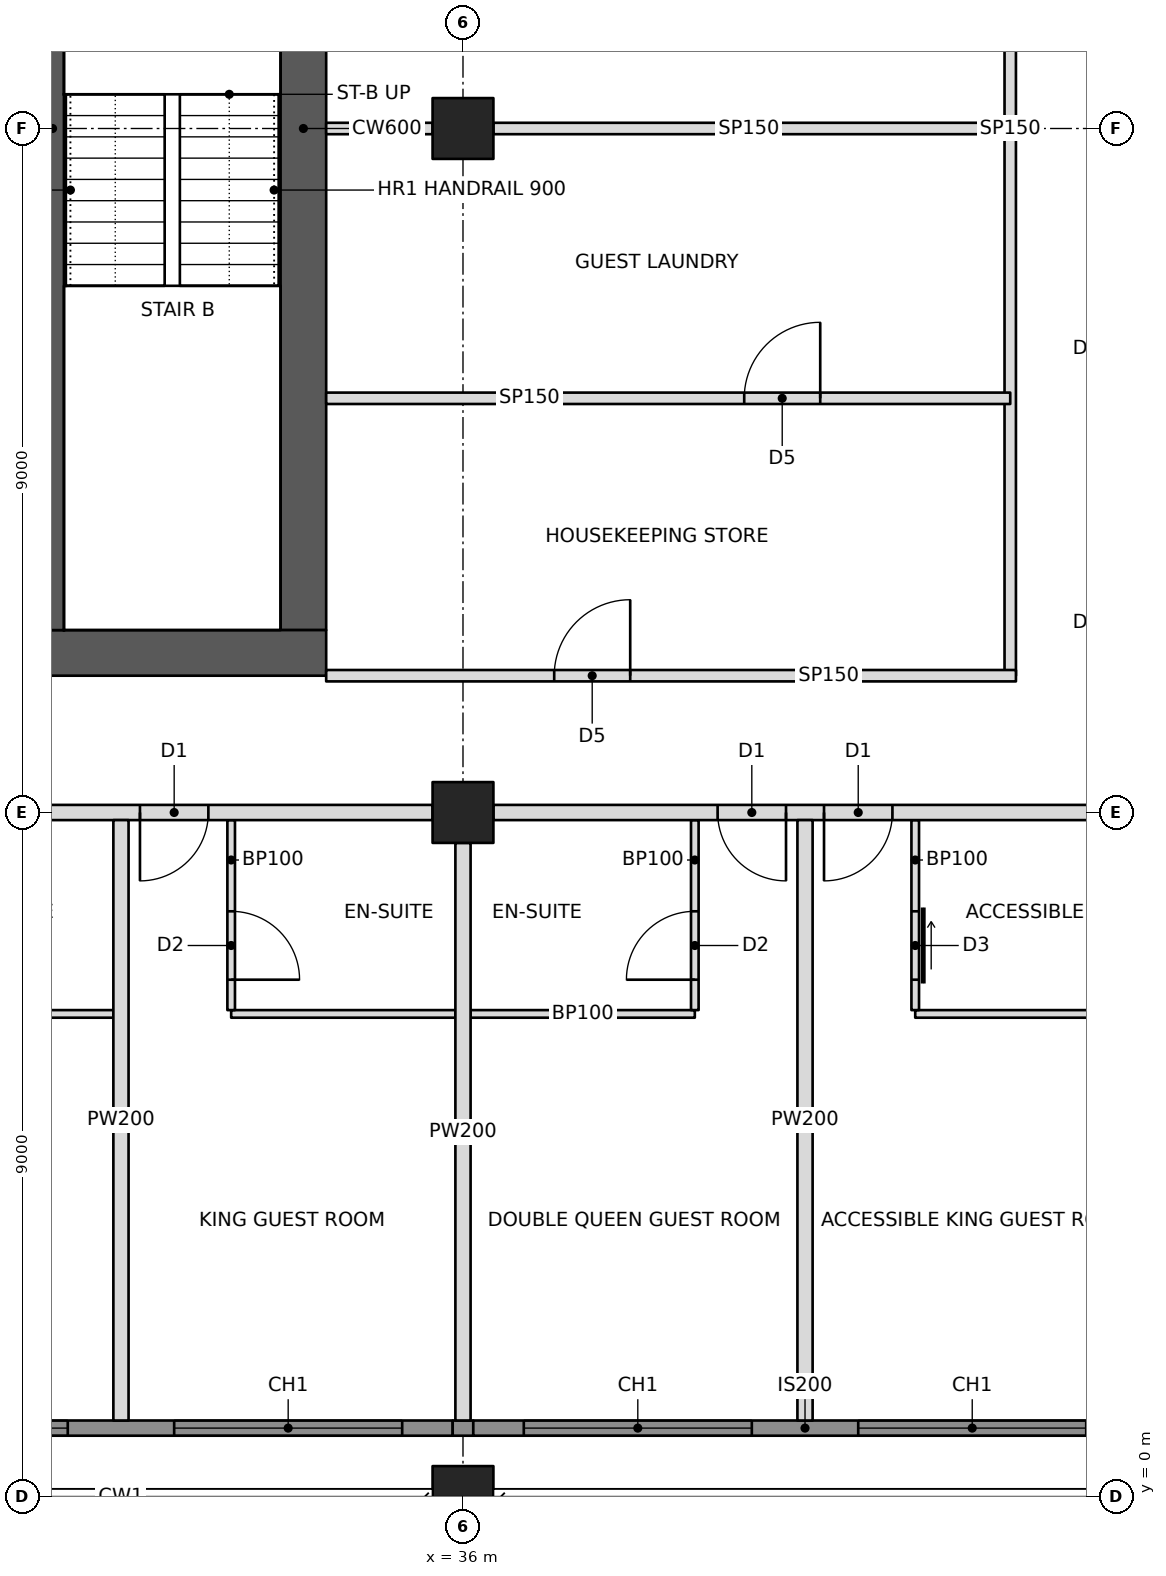
"""IFC4 building model, lengths in metres.
Left out: names, types, materials, properties, quantities, classifications, styles, units other than length and angle.
Written with IfcOpenShell. Run it as: python <this file> out.ifc"""

import sys

from ifc_helpers import new_model, si_unit, direction, frame, frame_2d, origin, origin_2d, place, context, subcontext, project, spatial, rectangle, hollow_rectangle, extrude, element, fill, save


model = new_model("IFC4")
c1 = context("Model", 3, precision=1e-05, world=origin(), true_north=direction((0.0, 1.0)))
c2 = subcontext(c1, "Body", "Model", "MODEL_VIEW")
j1 = project(units=[si_unit("LENGTHUNIT", "METRE"), si_unit("PLANEANGLEUNIT", "RADIAN")], contexts=[c1])
p1 = place(None, origin())
s1 = spatial("IfcSite", under=j1, at=p1, CompositionType="ELEMENT")
p2 = place(p1, origin())
s2 = spatial("IfcBuilding", under=s1, at=p2, CompositionType="ELEMENT")
p3 = place(p2, frame((0.0, 0.0, 82.4)))
s3 = spatial("IfcBuildingStorey", under=s2, at=p3, CompositionType="ELEMENT", Elevation=82.4)
p4 = place(p3, frame((36.0, 0.0, 0.0), z_axis=(0.0, 0.0, 1.0), x_axis=(1.0, 0.0, 0.0)))
e1 = element("IfcColumn", 1, at=p4, inside=s3, PredefinedType="COLUMN", context=c2, shape_type="SweptSolid", body=[
    extrude(hollow_rectangle(XDim=0.8, YDim=0.8, WallThickness=0.07, at=origin_2d()), origin(), (0.0, 0.0, 1.0), 3.4),
])
for number, where, z_axis, x_axis in (
    (2, (36.0, 9.0, 0.0), (0.0, 0.0, 1.0), (0.0, 1.0, 0.0)),
    (3, (36.0, 18.0, 0.0), (0.0, 0.0, 1.0), (0.0, 1.0, 0.0)),
):
    element("IfcColumn", number, at=place(p3, frame(where, z_axis=z_axis, x_axis=x_axis)), inside=s3, PredefinedType="COLUMN", context=c2, shape_type="SweptSolid", body=[
        extrude(hollow_rectangle(XDim=0.8, YDim=0.8, WallThickness=0.09, at=origin_2d()), origin(), (0.0, 0.0, 1.0), 3.4),
    ])
p5 = place(p3, frame((10.8, 11.1, 0.0), z_axis=(0.0, 0.0, 1.0), x_axis=(1.0, 0.0, 0.0)))
e4 = element("IfcWall", 4, at=p5, inside=s3, PredefinedType="SHEAR", context=c2, shape_type="SweptSolid", body=[
    extrude(rectangle(XDim=23.4, YDim=0.6, at=frame_2d((11.7, 0.0))), origin(), (0.0, 0.0, 1.0), 3.4),
])
p6 = place(p5, frame((1.0, 0.0, 0.0)))
e5 = element("IfcOpeningElement", 5, at=p6, cuts=e4, PredefinedType="OPENING", context=c2, shape_type="SweptSolid", body=[
    extrude(rectangle(XDim=1.0, YDim=2.1, at=frame_2d((0.5, 1.05))), frame((0.0, 0.31, 0.0), z_axis=(0.0, -1.0, 0.0), x_axis=(1.0, 0.0, 0.0)), (0.0, 0.0, 1.0), 0.62),
])
p7 = place(p5, frame((17.2, 0.0, 0.0)))
e6 = element("IfcOpeningElement", 6, at=p7, cuts=e4, PredefinedType="OPENING", context=c2, shape_type="SweptSolid", body=[
    extrude(rectangle(XDim=1.8, YDim=2.1, at=frame_2d((0.9, 1.05))), frame((0.0, 0.31, 0.0), z_axis=(0.0, -1.0, 0.0), x_axis=(1.0, 0.0, 0.0)), (0.0, 0.0, 1.0), 0.62),
])
p8 = place(p3, frame((33.9, 11.4, 0.0), z_axis=(0.0, 0.0, 1.0), x_axis=(0.0, 1.0, 0.0)))
e7 = element("IfcWall", 7, at=p8, inside=s3, PredefinedType="SHEAR", context=c2, shape_type="SweptSolid", body=[
    extrude(rectangle(XDim=13.2, YDim=0.6, at=frame_2d((6.6, 0.0))), origin(), (0.0, 0.0, 1.0), 3.4),
])
p9 = place(p3, frame((30.6, 11.4, 0.0), z_axis=(0.0, 0.0, 1.0), x_axis=(0.0, 1.0, 0.0)))
e8 = element("IfcWall", 8, at=p9, inside=s3, PredefinedType="SHEAR", context=c2, shape_type="SweptSolid", body=[
    extrude(rectangle(XDim=13.2, YDim=0.3, at=frame_2d((6.6, 0.0))), origin(), (0.0, 0.0, 1.0), 3.4),
])
p10 = place(p3, frame((27.4, 9.0, 0.0), z_axis=(0.0, 0.0, 1.0), x_axis=(1.0, 0.0, 0.0)))
e9 = element("IfcWall", 9, at=p10, inside=s3, PredefinedType="PARTITIONING", context=c2, shape_type="SweptSolid", body=[
    extrude(rectangle(XDim=8.2, YDim=0.2, at=frame_2d((4.1, 0.0))), origin(), (0.0, 0.0, 1.0), 2.405),
])
p11 = place(p10, frame((4.35, 0.0, 0.0)))
e10 = element("IfcOpeningElement", 10, at=p11, cuts=e9, PredefinedType="OPENING", context=c2, shape_type="SweptSolid", body=[
    extrude(rectangle(XDim=0.9, YDim=2.1, at=frame_2d((0.45, 1.05))), frame((0.0, 0.11, 0.0), z_axis=(0.0, -1.0, 0.0), x_axis=(1.0, 0.0, 0.0)), (0.0, 0.0, 1.0), 0.22),
])
p12 = place(p3, frame((36.4, 9.0, 0.0), z_axis=(0.0, 0.0, 1.0), x_axis=(1.0, 0.0, 0.0)))
e11 = element("IfcWall", 11, at=p12, inside=s3, PredefinedType="PARTITIONING", context=c2, shape_type="SweptSolid", body=[
    extrude(rectangle(XDim=8.2, YDim=0.2, at=frame_2d((4.1, 0.0))), origin(), (0.0, 0.0, 1.0), 2.438),
])
p13 = place(p12, frame((2.95, 0.0, 0.0)))
e12 = element("IfcOpeningElement", 12, at=p13, cuts=e11, PredefinedType="OPENING", context=c2, shape_type="SweptSolid", body=[
    extrude(rectangle(XDim=0.9, YDim=2.1, at=frame_2d((0.45, 1.05))), frame((0.0, 0.11, 0.0), z_axis=(0.0, -1.0, 0.0), x_axis=(1.0, 0.0, 0.0)), (0.0, 0.0, 1.0), 0.22),
])
p14 = place(p12, frame((4.35, 0.0, 0.0)))
e13 = element("IfcOpeningElement", 13, at=p14, cuts=e11, PredefinedType="OPENING", context=c2, shape_type="SweptSolid", body=[
    extrude(rectangle(XDim=0.9, YDim=2.1, at=frame_2d((0.45, 1.05))), frame((0.0, 0.11, 0.0), z_axis=(0.0, -1.0, 0.0), x_axis=(1.0, 0.0, 0.0)), (0.0, 0.0, 1.0), 0.22),
])
p15 = place(p3, frame((34.2, 10.8, 0.0), z_axis=(0.0, 0.0, 1.0), x_axis=(1.0, 0.0, 0.0)))
e14 = element("IfcWall", 14, at=p15, inside=s3, PredefinedType="PARTITIONING", context=c2, shape_type="SweptSolid", body=[
    extrude(rectangle(XDim=9.075, YDim=0.15, at=frame_2d((4.538, 0.0))), origin(), (0.0, 0.0, 1.0), 2.404),
])
p16 = place(p15, frame((3.0, 0.0, 0.0)))
e15 = element("IfcOpeningElement", 15, at=p16, cuts=e14, PredefinedType="OPENING", context=c2, shape_type="SweptSolid", body=[
    extrude(rectangle(XDim=1.0, YDim=2.1, at=frame_2d((0.5, 1.05))), frame((0.0, 0.085, 0.0), z_axis=(0.0, -1.0, 0.0), x_axis=(1.0, 0.0, 0.0)), (0.0, 0.0, 1.0), 0.17),
])
p17 = place(p3, frame((43.2, 10.8, 0.0), z_axis=(0.0, 0.0, 1.0), x_axis=(0.0, 1.0, 0.0)))
e16 = element("IfcWall", 16, at=p17, inside=s3, PredefinedType="PARTITIONING", context=c2, shape_type="SweptSolid", body=[
    extrude(rectangle(XDim=14.4, YDim=0.15, at=frame_2d((7.2, 0.0))), origin(), (0.0, 0.0, 1.0), 2.404),
])
p18 = place(p3, frame((34.2, 18.0, 0.0), z_axis=(0.0, 0.0, 1.0), x_axis=(1.0, 0.0, 0.0)))
e17 = element("IfcWall", 17, at=p18, inside=s3, PredefinedType="PARTITIONING", context=c2, shape_type="SweptSolid", body=[
    extrude(rectangle(XDim=1.4, YDim=0.15, at=frame_2d((0.7, 0.0))), origin(), (0.0, 0.0, 1.0), 3.2),
])
p19 = place(p3, frame((36.4, 18.0, 0.0), z_axis=(0.0, 0.0, 1.0), x_axis=(1.0, 0.0, 0.0)))
e18 = element("IfcWall", 18, at=p19, inside=s3, PredefinedType="PARTITIONING", context=c2, shape_type="SweptSolid", body=[
    extrude(rectangle(XDim=6.725, YDim=0.15, at=frame_2d((3.363, 0.0))), origin(), (0.0, 0.0, 1.0), 2.405),
])
p20 = place(p3, frame((34.2, 14.45, 0.0), z_axis=(0.0, 0.0, 1.0), x_axis=(1.0, 0.0, 0.0)))
e19 = element("IfcWall", 19, at=p20, inside=s3, PredefinedType="PARTITIONING", context=c2, shape_type="SweptSolid", body=[
    extrude(rectangle(XDim=9.0, YDim=0.15, at=frame_2d((4.5, 0.0))), origin(), (0.0, 0.0, 1.0), 2.404),
])
p21 = place(p20, frame((5.5, 0.0, 0.0)))
e20 = element("IfcOpeningElement", 20, at=p21, cuts=e19, PredefinedType="OPENING", context=c2, shape_type="SweptSolid", body=[
    extrude(rectangle(XDim=1.0, YDim=2.1, at=frame_2d((0.5, 1.05))), frame((0.0, 0.085, 0.0), z_axis=(0.0, -1.0, 0.0), x_axis=(1.0, 0.0, 0.0)), (0.0, 0.0, 1.0), 0.17),
])
p22 = place(p3, frame((31.5, 8.9, 0.0), z_axis=(0.0, 0.0, 1.0), x_axis=(0.0, -1.0, 0.0)))
e21 = element("IfcWall", 21, at=p22, inside=s3, PredefinedType="PARTITIONING", context=c2, shape_type="SweptSolid", body=[
    extrude(rectangle(XDim=7.9, YDim=0.2, at=frame_2d((3.95, 0.0))), origin(), (0.0, 0.0, 1.0), 2.404),
])
p23 = place(p3, frame((36.0, 8.6, 0.0), z_axis=(0.0, 0.0, 1.0), x_axis=(0.0, -1.0, 0.0)))
e22 = element("IfcWall", 22, at=p23, inside=s3, PredefinedType="PARTITIONING", context=c2, shape_type="SweptSolid", body=[
    extrude(rectangle(XDim=7.6, YDim=0.2, at=frame_2d((3.8, 0.0))), origin(), (0.0, 0.0, 1.0), 2.438),
])
p24 = place(p3, frame((40.5, 8.9, 0.0), z_axis=(0.0, 0.0, 1.0), x_axis=(0.0, -1.0, 0.0)))
e23 = element("IfcWall", 23, at=p24, inside=s3, PredefinedType="PARTITIONING", context=c2, shape_type="SweptSolid", body=[
    extrude(rectangle(XDim=7.9, YDim=0.2, at=frame_2d((3.95, 0.0))), origin(), (0.0, 0.0, 1.0), 2.438),
])
p25 = place(p3, frame((27.95, 6.35, 0.0), z_axis=(0.0, 0.0, 1.0), x_axis=(1.0, 0.0, 0.0)))
e24 = element("IfcWall", 24, at=p25, inside=s3, PredefinedType="PARTITIONING", context=c2, shape_type="SweptSolid", body=[
    extrude(rectangle(XDim=3.45, YDim=0.1, at=frame_2d((1.725, 0.0))), origin(), (0.0, 0.0, 1.0), 3.2),
])
p26 = place(p3, frame((32.95, 6.35, 0.0), z_axis=(0.0, 0.0, 1.0), x_axis=(1.0, 0.0, 0.0)))
e25 = element("IfcWall", 25, at=p26, inside=s3, PredefinedType="PARTITIONING", context=c2, shape_type="SweptSolid", body=[
    extrude(rectangle(XDim=2.95, YDim=0.1, at=frame_2d((1.475, 0.0))), origin(), (0.0, 0.0, 1.0), 2.438),
])
p27 = place(p3, frame((32.95, 8.9, 0.0), z_axis=(0.0, 0.0, 1.0), x_axis=(0.0, -1.0, 0.0)))
e26 = element("IfcWall", 26, at=p27, inside=s3, PredefinedType="PARTITIONING", context=c2, shape_type="SweptSolid", body=[
    extrude(rectangle(XDim=2.5, YDim=0.1, at=frame_2d((1.25, 0.0))), origin(), (0.0, 0.0, 1.0), 2.404),
])
p28 = place(p27, frame((1.2, 0.0, 0.0)))
e27 = element("IfcOpeningElement", 27, at=p28, cuts=e26, PredefinedType="OPENING", context=c2, shape_type="SweptSolid", body=[
    extrude(rectangle(XDim=0.9, YDim=2.1, at=frame_2d((0.45, 1.05))), frame((0.0, 0.06, 0.0), z_axis=(0.0, -1.0, 0.0), x_axis=(1.0, 0.0, 0.0)), (0.0, 0.0, 1.0), 0.12),
])
p29 = place(p3, frame((36.1, 6.35, 0.0), z_axis=(0.0, 0.0, 1.0), x_axis=(1.0, 0.0, 0.0)))
e28 = element("IfcWall", 28, at=p29, inside=s3, PredefinedType="PARTITIONING", context=c2, shape_type="SweptSolid", body=[
    extrude(rectangle(XDim=2.95, YDim=0.1, at=frame_2d((1.475, 0.0))), origin(), (0.0, 0.0, 1.0), 2.438),
])
p30 = place(p3, frame((39.05, 8.9, 0.0), z_axis=(0.0, 0.0, 1.0), x_axis=(0.0, -1.0, 0.0)))
e29 = element("IfcWall", 29, at=p30, inside=s3, PredefinedType="PARTITIONING", context=c2, shape_type="SweptSolid", body=[
    extrude(rectangle(XDim=2.5, YDim=0.1, at=frame_2d((1.25, 0.0))), origin(), (0.0, 0.0, 1.0), 2.438),
])
p31 = place(p30, frame((1.2, 0.0, 0.0)))
e30 = element("IfcOpeningElement", 30, at=p31, cuts=e29, PredefinedType="OPENING", context=c2, shape_type="SweptSolid", body=[
    extrude(rectangle(XDim=0.9, YDim=2.1, at=frame_2d((0.45, 1.05))), frame((0.0, 0.06, 0.0), z_axis=(0.0, -1.0, 0.0), x_axis=(1.0, 0.0, 0.0)), (0.0, 0.0, 1.0), 0.12),
])
p32 = place(p3, frame((41.95, 6.35, 0.0), z_axis=(0.0, 0.0, 1.0), x_axis=(1.0, 0.0, 0.0)))
e31 = element("IfcWall", 31, at=p32, inside=s3, PredefinedType="PARTITIONING", context=c2, shape_type="SweptSolid", body=[
    extrude(rectangle(XDim=2.95, YDim=0.1, at=frame_2d((1.475, 0.0))), origin(), (0.0, 0.0, 1.0), 2.438),
])
p33 = place(p3, frame((41.95, 8.9, 0.0), z_axis=(0.0, 0.0, 1.0), x_axis=(0.0, -1.0, 0.0)))
e32 = element("IfcWall", 32, at=p33, inside=s3, PredefinedType="PARTITIONING", context=c2, shape_type="SweptSolid", body=[
    extrude(rectangle(XDim=2.5, YDim=0.1, at=frame_2d((1.25, 0.0))), origin(), (0.0, 0.0, 1.0), 2.438),
])
p34 = place(p33, frame((1.2, 0.0, 0.0)))
e33 = element("IfcOpeningElement", 33, at=p34, cuts=e32, PredefinedType="OPENING", context=c2, shape_type="SweptSolid", body=[
    extrude(rectangle(XDim=0.9, YDim=2.1, at=frame_2d((0.45, 1.05))), frame((0.0, 0.06, 0.0), z_axis=(0.0, -1.0, 0.0), x_axis=(1.0, 0.0, 0.0)), (0.0, 0.0, 1.0), 0.12),
])
p35 = place(p3, frame((27.194, 0.9, 0.0), z_axis=(0.0, 0.0, 1.0), x_axis=(1.0, 0.0, 0.0)))
e34 = element("IfcWall", 34, at=p35, inside=s3, PredefinedType="SOLIDWALL", context=c2, shape_type="SweptSolid", body=[
    extrude(rectangle(XDim=8.671, YDim=0.2, at=frame_2d((4.335, 0.0))), origin(), (0.0, 0.0, 1.0), 3.2),
])
p36 = place(p35, frame((0.606, 0.0, 0.6)))
e35 = element("IfcOpeningElement", 35, at=p36, cuts=e34, PredefinedType="OPENING", context=c2, shape_type="SweptSolid", body=[
    extrude(rectangle(XDim=3.0, YDim=2.2, at=frame_2d((1.5, 1.1))), frame((0.0, 0.11, 0.0), z_axis=(0.0, -1.0, 0.0), x_axis=(1.0, 0.0, 0.0)), (0.0, 0.0, 1.0), 0.22),
])
p37 = place(p35, frame((5.006, 0.0, 0.6)))
e36 = element("IfcOpeningElement", 36, at=p37, cuts=e34, PredefinedType="OPENING", context=c2, shape_type="SweptSolid", body=[
    extrude(rectangle(XDim=3.0, YDim=2.2, at=frame_2d((1.5, 1.1))), frame((0.0, 0.11, 0.0), z_axis=(0.0, -1.0, 0.0), x_axis=(1.0, 0.0, 0.0)), (0.0, 0.0, 1.0), 0.22),
])
p38 = place(p3, frame((35.865, 0.9, 0.0), z_axis=(0.0, 0.0, 1.0), x_axis=(1.0, 0.0, 0.0)))
e37 = element("IfcWall", 37, at=p38, inside=s3, PredefinedType="SOLIDWALL", context=c2, shape_type="SweptSolid", body=[
    extrude(rectangle(XDim=0.271, YDim=0.2, at=frame_2d((0.135, 0.0))), origin(), (0.0, 0.0, 1.0), 2.438),
])
p39 = place(p3, frame((36.135, 0.9, 0.0), z_axis=(0.0, 0.0, 1.0), x_axis=(1.0, 0.0, 0.0)))
e38 = element("IfcWall", 38, at=p39, inside=s3, PredefinedType="SOLIDWALL", context=c2, shape_type="SweptSolid", body=[
    extrude(rectangle(XDim=8.729, YDim=0.2, at=frame_2d((4.365, 0.0))), origin(), (0.0, 0.0, 1.0), 3.2),
])
p40 = place(p39, frame((0.665, 0.0, 0.6)))
e39 = element("IfcOpeningElement", 39, at=p40, cuts=e38, PredefinedType="OPENING", context=c2, shape_type="SweptSolid", body=[
    extrude(rectangle(XDim=3.0, YDim=2.2, at=frame_2d((1.5, 1.1))), frame((0.0, 0.11, 0.0), z_axis=(0.0, -1.0, 0.0), x_axis=(1.0, 0.0, 0.0)), (0.0, 0.0, 1.0), 0.22),
])
p41 = place(p39, frame((5.065, 0.0, 0.6)))
e40 = element("IfcOpeningElement", 40, at=p41, cuts=e38, PredefinedType="OPENING", context=c2, shape_type="SweptSolid", body=[
    extrude(rectangle(XDim=3.0, YDim=2.2, at=frame_2d((1.5, 1.1))), frame((0.0, 0.11, 0.0), z_axis=(0.0, -1.0, 0.0), x_axis=(1.0, 0.0, 0.0)), (0.0, 0.0, 1.0), 0.22),
])
p42 = place(p36, origin())
e41 = element("IfcWindow", 41, at=p42, inside=s3, PartitioningType="TRIPLE_PANEL_VERTICAL", PredefinedType="WINDOW", context=c2, shape_type="SweptSolid", body=[
    extrude(rectangle(XDim=3.0, YDim=2.2, at=frame_2d((1.5, 1.1))), frame((0.0, 0.03, 0.0), z_axis=(0.0, -1.0, 0.0), x_axis=(1.0, 0.0, 0.0)), (0.0, 0.0, 1.0), 0.06),
])
fill(e35, e41)
p43 = place(p37, origin())
e42 = element("IfcWindow", 42, at=p43, inside=s3, PartitioningType="TRIPLE_PANEL_VERTICAL", PredefinedType="WINDOW", context=c2, shape_type="SweptSolid", body=[
    extrude(rectangle(XDim=3.0, YDim=2.2, at=frame_2d((1.5, 1.1))), frame((0.0, 0.03, 0.0), z_axis=(0.0, -1.0, 0.0), x_axis=(1.0, 0.0, 0.0)), (0.0, 0.0, 1.0), 0.06),
])
fill(e36, e42)
p44 = place(p40, origin())
e43 = element("IfcWindow", 43, at=p44, inside=s3, PartitioningType="TRIPLE_PANEL_VERTICAL", PredefinedType="WINDOW", context=c2, shape_type="SweptSolid", body=[
    extrude(rectangle(XDim=3.0, YDim=2.2, at=frame_2d((1.5, 1.1))), frame((0.0, 0.03, 0.0), z_axis=(0.0, -1.0, 0.0), x_axis=(1.0, 0.0, 0.0)), (0.0, 0.0, 1.0), 0.06),
])
fill(e39, e43)
p45 = place(p41, origin())
e44 = element("IfcWindow", 44, at=p45, inside=s3, PartitioningType="TRIPLE_PANEL_VERTICAL", PredefinedType="WINDOW", context=c2, shape_type="SweptSolid", body=[
    extrude(rectangle(XDim=3.0, YDim=2.2, at=frame_2d((1.5, 1.1))), frame((0.0, 0.03, 0.0), z_axis=(0.0, -1.0, 0.0), x_axis=(1.0, 0.0, 0.0)), (0.0, 0.0, 1.0), 0.06),
])
fill(e40, e44)
p46 = place(p21, origin())
e45 = element("IfcDoor", 45, at=p46, inside=s3, OperationType="SINGLE_SWING_RIGHT", PredefinedType="DOOR", context=c2, shape_type="SweptSolid", body=[
    extrude(rectangle(XDim=1.0, YDim=2.1, at=frame_2d((0.5, 1.05))), frame((0.0, 0.025, 0.0), z_axis=(0.0, -1.0, 0.0), x_axis=(1.0, 0.0, 0.0)), (0.0, 0.0, 1.0), 0.05),
])
fill(e20, e45)
p47 = place(p16, origin())
e46 = element("IfcDoor", 46, at=p47, inside=s3, OperationType="SINGLE_SWING_RIGHT", PredefinedType="DOOR", context=c2, shape_type="SweptSolid", body=[
    extrude(rectangle(XDim=1.0, YDim=2.1, at=frame_2d((0.5, 1.05))), frame((0.0, 0.025, 0.0), z_axis=(0.0, -1.0, 0.0), x_axis=(1.0, 0.0, 0.0)), (0.0, 0.0, 1.0), 0.05),
])
fill(e15, e46)
p48 = place(p28, origin())
e47 = element("IfcDoor", 47, at=p48, inside=s3, OperationType="SINGLE_SWING_RIGHT", PredefinedType="DOOR", context=c2, shape_type="SweptSolid", body=[
    extrude(rectangle(XDim=0.9, YDim=2.1, at=frame_2d((0.45, 1.05))), frame((0.0, 0.025, 0.0), z_axis=(0.0, -1.0, 0.0), x_axis=(1.0, 0.0, 0.0)), (0.0, 0.0, 1.0), 0.05),
])
fill(e27, e47)
p49 = place(p11, frame((0.9, 0.0, 0.0), z_axis=(0.0, 0.0, 1.0), x_axis=(-1.0, 0.0, 0.0)))
e48 = element("IfcDoor", 48, at=p49, inside=s3, OperationType="SINGLE_SWING_RIGHT", PredefinedType="DOOR", context=c2, shape_type="SweptSolid", body=[
    extrude(rectangle(XDim=0.9, YDim=2.1, at=frame_2d((0.45, 1.05))), frame((0.0, 0.025, 0.0), z_axis=(0.0, -1.0, 0.0), x_axis=(1.0, 0.0, 0.0)), (0.0, 0.0, 1.0), 0.05),
])
fill(e10, e48)
p50 = place(p31, frame((0.9, 0.0, 0.0), z_axis=(0.0, 0.0, 1.0), x_axis=(-1.0, 0.0, 0.0)))
e49 = element("IfcDoor", 49, at=p50, inside=s3, OperationType="SINGLE_SWING_LEFT", PredefinedType="DOOR", context=c2, shape_type="SweptSolid", body=[
    extrude(rectangle(XDim=0.9, YDim=2.1, at=frame_2d((0.45, 1.05))), frame((0.0, 0.025, 0.0), z_axis=(0.0, -1.0, 0.0), x_axis=(1.0, 0.0, 0.0)), (0.0, 0.0, 1.0), 0.05),
])
fill(e30, e49)
p51 = place(p13, frame((0.9, 0.0, 0.0), z_axis=(0.0, 0.0, 1.0), x_axis=(-1.0, 0.0, 0.0)))
e50 = element("IfcDoor", 50, at=p51, inside=s3, OperationType="SINGLE_SWING_LEFT", PredefinedType="DOOR", context=c2, shape_type="SweptSolid", body=[
    extrude(rectangle(XDim=0.9, YDim=2.1, at=frame_2d((0.45, 1.05))), frame((0.0, 0.025, 0.0), z_axis=(0.0, -1.0, 0.0), x_axis=(1.0, 0.0, 0.0)), (0.0, 0.0, 1.0), 0.05),
])
fill(e12, e50)
p52 = place(p34, origin())
e51 = element("IfcDoor", 51, at=p52, inside=s3, OperationType="SLIDING_TO_LEFT", PredefinedType="DOOR", context=c2, shape_type="SweptSolid", body=[
    extrude(rectangle(XDim=0.9, YDim=2.1, at=frame_2d((0.45, 1.05))), frame((0.0, 0.025, 0.0), z_axis=(0.0, -1.0, 0.0), x_axis=(1.0, 0.0, 0.0)), (0.0, 0.0, 1.0), 0.05),
])
fill(e33, e51)
p53 = place(p14, frame((0.9, 0.0, 0.0), z_axis=(0.0, 0.0, 1.0), x_axis=(-1.0, 0.0, 0.0)))
e52 = element("IfcDoor", 52, at=p53, inside=s3, OperationType="SINGLE_SWING_RIGHT", PredefinedType="DOOR", context=c2, shape_type="SweptSolid", body=[
    extrude(rectangle(XDim=0.9, YDim=2.1, at=frame_2d((0.45, 1.05))), frame((0.0, 0.025, 0.0), z_axis=(0.0, -1.0, 0.0), x_axis=(1.0, 0.0, 0.0)), (0.0, 0.0, 1.0), 0.05),
])
fill(e13, e52)
save(model, sys.argv[1])
